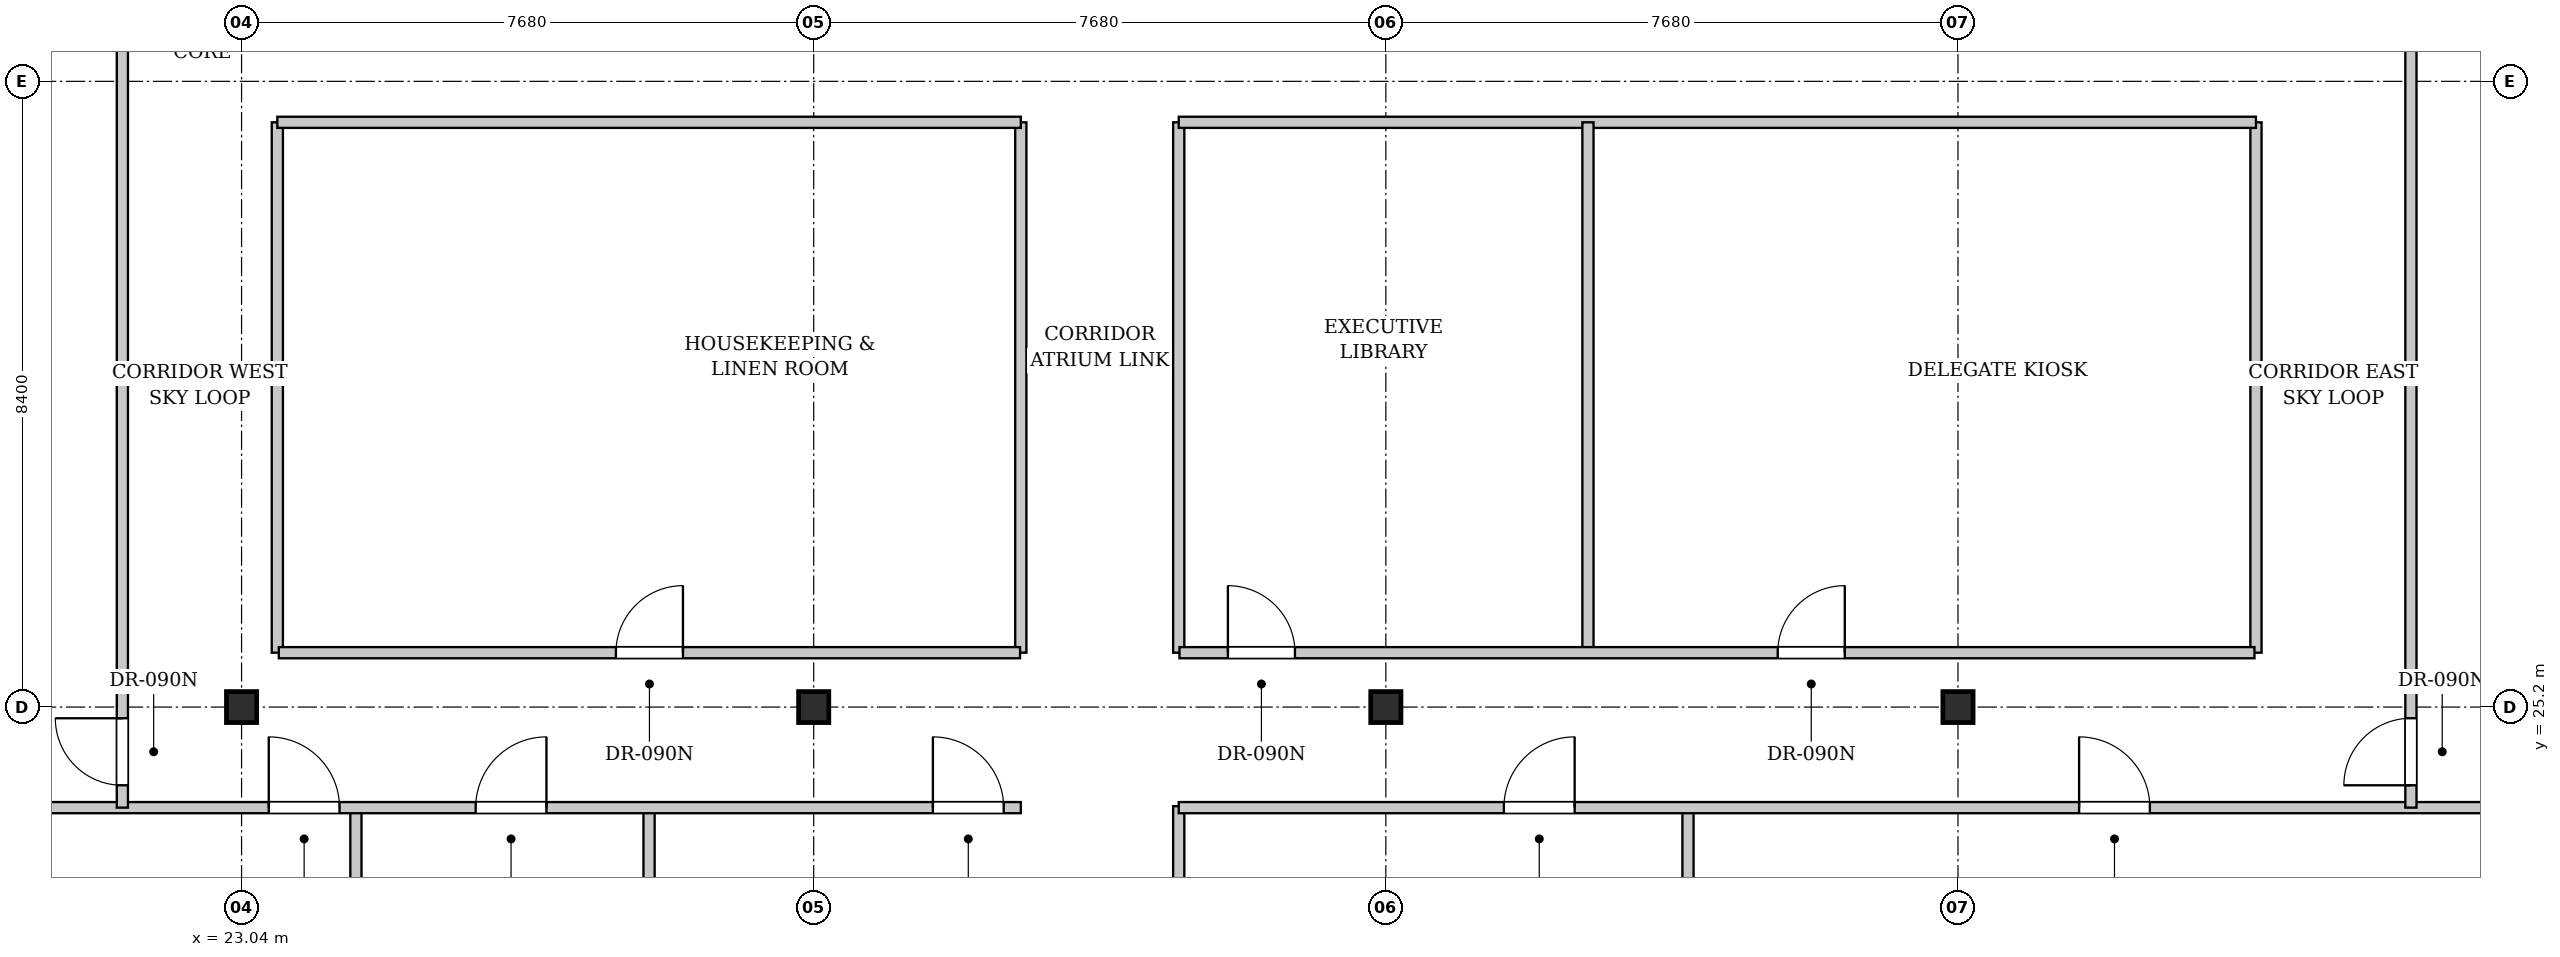
"""IFC4 building model, lengths in metres.
Left out: names, types, materials, properties, quantities, classifications, styles, units other than length and angle.
Written with IfcOpenShell. Run it as: python <this file> out.ifc"""

import sys

from ifc_helpers import new_model, si_unit, direction, frame, frame_2d, origin, origin_2d, place, context, subcontext, project, spatial, rectangle, i_section, extrude, element, fill, save


model = new_model("IFC4")
c1 = context("Model", 3, precision=1e-05, world=origin(), true_north=direction((0.0, 1.0)))
c2 = subcontext(c1, "Body", "Model", "MODEL_VIEW")
j1 = project(units=[si_unit("LENGTHUNIT", "METRE"), si_unit("PLANEANGLEUNIT", "RADIAN")], contexts=[c1])
p1 = place(None, origin())
s1 = spatial("IfcSite", under=j1, at=p1, CompositionType="ELEMENT")
p2 = place(p1, origin())
s2 = spatial("IfcBuilding", under=s1, at=p2, CompositionType="ELEMENT")
p3 = place(p2, frame((0.0, 0.0, 282.9)))
s3 = spatial("IfcBuildingStorey", under=s2, at=p3, CompositionType="ELEMENT", Elevation=282.9)
for number, where, z_axis, x_axis in (
    (1, (23.04, 25.2, 0.0), (0.0, 0.0, 1.0), (1.0, 0.0, 0.0)),
    (2, (30.72, 25.2, 0.0), (0.0, 0.0, 1.0), (1.0, 0.0, 0.0)),
    (3, (38.4, 25.2, 0.0), (0.0, 0.0, 1.0), (1.0, 0.0, 0.0)),
    (4, (46.08, 25.2, 0.0), (0.0, 0.0, 1.0), (1.0, 0.0, 0.0)),
):
    element("IfcColumn", number, at=place(p3, frame(where, z_axis=z_axis, x_axis=x_axis)), inside=s3, PredefinedType="COLUMN", context=c2, shape_type="SweptSolid", body=[
        extrude(i_section(OverallWidth=0.406, OverallDepth=0.416, WebThickness=0.03, FlangeThickness=0.048, FilletRadius=0.015, at=origin_2d()), origin(), (0.0, 0.0, 1.0), 3.4),
    ])
p4 = place(p3, frame((24.575, 18.075, 0.0), z_axis=(0.0, 0.0, 1.0), x_axis=(0.0, 1.0, 0.0)))
e5 = element("IfcWall", 5, at=p4, inside=s3, PredefinedType="PARTITIONING", context=c2, shape_type="SweptSolid", body=[
    extrude(rectangle(XDim=5.795, YDim=0.15, at=frame_2d((2.897, 0.0))), origin(), (0.0, 0.0, 1.0), 3.18),
])
p5 = place(p3, frame((28.51, 17.731, 0.0), z_axis=(0.0, 0.0, 1.0), x_axis=(0.0, 1.0, 0.0)))
e6 = element("IfcWall", 6, at=p5, inside=s3, PredefinedType="PARTITIONING", context=c2, shape_type="SweptSolid", body=[
    extrude(rectangle(XDim=6.139, YDim=0.15, at=frame_2d((3.07, 0.0))), origin(), (0.0, 0.0, 1.0), 3.18),
])
p6 = place(p3, frame((35.62, 17.109, 0.0), z_axis=(0.0, 0.0, 1.0), x_axis=(0.0, 1.0, 0.0)))
e7 = element("IfcWall", 7, at=p6, inside=s3, PredefinedType="PARTITIONING", context=c2, shape_type="SweptSolid", body=[
    extrude(rectangle(XDim=6.761, YDim=0.15, at=frame_2d((3.381, 0.0))), origin(), (0.0, 0.0, 1.0), 3.18),
])
p7 = place(p3, frame((42.456, 16.511, 0.0), z_axis=(0.0, 0.0, 1.0), x_axis=(0.0, 1.0, 0.0)))
e8 = element("IfcWall", 8, at=p7, inside=s3, PredefinedType="PARTITIONING", context=c2, shape_type="SweptSolid", body=[
    extrude(rectangle(XDim=7.359, YDim=0.15, at=frame_2d((3.68, 0.0))), origin(), (0.0, 0.0, 1.0), 3.18),
])
p8 = place(p3, frame((5.847, 23.85, 0.0), z_axis=(0.0, 0.0, 1.0), x_axis=(1.0, 0.0, 0.0)))
e9 = element("IfcWall", 9, at=p8, inside=s3, PredefinedType="PARTITIONING", context=c2, shape_type="SweptSolid", body=[
    extrude(rectangle(XDim=27.653, YDim=0.15, at=frame_2d((13.827, 0.0))), origin(), (0.0, 0.0, 1.0), 2.575),
])
p9 = place(p8, frame((17.558, 0.0, 0.0)))
e10 = element("IfcOpeningElement", 10, at=p9, cuts=e9, PredefinedType="OPENING", context=c2, shape_type="SweptSolid", body=[
    extrude(rectangle(XDim=0.95, YDim=2.15, at=frame_2d((0.475, 1.075))), frame((0.0, 0.085, 0.0), z_axis=(0.0, -1.0, 0.0), x_axis=(1.0, 0.0, 0.0)), (0.0, 0.0, 1.0), 0.17),
])
p10 = place(p8, frame((20.336, 0.0, 0.0)))
e11 = element("IfcOpeningElement", 11, at=p10, cuts=e9, PredefinedType="OPENING", context=c2, shape_type="SweptSolid", body=[
    extrude(rectangle(XDim=0.95, YDim=2.15, at=frame_2d((0.475, 1.075))), frame((0.0, 0.085, 0.0), z_axis=(0.0, -1.0, 0.0), x_axis=(1.0, 0.0, 0.0)), (0.0, 0.0, 1.0), 0.17),
])
p11 = place(p8, frame((26.473, 0.0, 0.0)))
e12 = element("IfcOpeningElement", 12, at=p11, cuts=e9, PredefinedType="OPENING", context=c2, shape_type="SweptSolid", body=[
    extrude(rectangle(XDim=0.95, YDim=2.15, at=frame_2d((0.475, 1.075))), frame((0.0, 0.085, 0.0), z_axis=(0.0, -1.0, 0.0), x_axis=(1.0, 0.0, 0.0)), (0.0, 0.0, 1.0), 0.17),
])
p12 = place(p3, frame((35.62, 23.85, 0.0), z_axis=(0.0, 0.0, 1.0), x_axis=(1.0, 0.0, 0.0)))
e13 = element("IfcWall", 13, at=p12, inside=s3, PredefinedType="PARTITIONING", context=c2, shape_type="SweptSolid", body=[
    extrude(rectangle(XDim=20.257, YDim=0.15, at=frame_2d((10.128, 0.0))), origin(), (0.0, 0.0, 1.0), 3.18),
])
p13 = place(p12, frame((4.365, 0.0, 0.0)))
e14 = element("IfcOpeningElement", 14, at=p13, cuts=e13, PredefinedType="OPENING", context=c2, shape_type="SweptSolid", body=[
    extrude(rectangle(XDim=0.95, YDim=2.15, at=frame_2d((0.475, 1.075))), frame((0.0, 0.085, 0.0), z_axis=(0.0, -1.0, 0.0), x_axis=(1.0, 0.0, 0.0)), (0.0, 0.0, 1.0), 0.17),
])
p14 = place(p12, frame((12.086, 0.0, 0.0)))
e15 = element("IfcOpeningElement", 15, at=p14, cuts=e13, PredefinedType="OPENING", context=c2, shape_type="SweptSolid", body=[
    extrude(rectangle(XDim=0.95, YDim=2.15, at=frame_2d((0.475, 1.075))), frame((0.0, 0.085, 0.0), z_axis=(0.0, -1.0, 0.0), x_axis=(1.0, 0.0, 0.0)), (0.0, 0.0, 1.0), 0.17),
])
p15 = place(p3, frame((21.44, 23.85, 0.0), z_axis=(0.0, 0.0, 1.0), x_axis=(0.0, 1.0, 0.0)))
e16 = element("IfcWall", 16, at=p15, inside=s3, PredefinedType="PARTITIONING", context=c2, shape_type="SweptSolid", body=[
    extrude(rectangle(XDim=25.658, YDim=0.15, at=frame_2d((12.829, 0.0))), origin(), (0.0, 0.0, 1.0), 2.575),
])
p16 = place(p15, frame((0.3, 0.0, 0.0)))
e17 = element("IfcOpeningElement", 17, at=p16, cuts=e16, PredefinedType="OPENING", context=c2, shape_type="SweptSolid", body=[
    extrude(rectangle(XDim=0.9, YDim=2.15, at=frame_2d((0.45, 1.075))), frame((0.0, 0.085, 0.0), z_axis=(0.0, -1.0, 0.0), x_axis=(1.0, 0.0, 0.0)), (0.0, 0.0, 1.0), 0.17),
])
p17 = place(p3, frame((52.16, 23.85, 0.0), z_axis=(0.0, 0.0, 1.0), x_axis=(0.0, 1.0, 0.0)))
e18 = element("IfcWall", 18, at=p17, inside=s3, PredefinedType="PARTITIONING", context=c2, shape_type="SweptSolid", body=[
    extrude(rectangle(XDim=11.29, YDim=0.15, at=frame_2d((5.645, 0.0))), origin(), (0.0, 0.0, 1.0), 3.18),
])
p18 = place(p17, frame((0.3, 0.0, 0.0)))
e19 = element("IfcOpeningElement", 19, at=p18, cuts=e18, PredefinedType="OPENING", context=c2, shape_type="SweptSolid", body=[
    extrude(rectangle(XDim=0.9, YDim=2.15, at=frame_2d((0.45, 1.075))), frame((0.0, 0.085, 0.0), z_axis=(0.0, -1.0, 0.0), x_axis=(1.0, 0.0, 0.0)), (0.0, 0.0, 1.0), 0.17),
])
for number, where, z_axis, x_axis in (
    (20, (23.52, 25.93, 0.0), (0.0, 0.0, 1.0), (0.0, 1.0, 0.0)),
    (21, (50.08, 25.93, 0.0), (0.0, 0.0, 1.0), (0.0, 1.0, 0.0)),
    (22, (33.5, 25.93, 0.0), (0.0, 0.0, 1.0), (0.0, 1.0, 0.0)),
    (23, (35.62, 25.93, 0.0), (0.0, 0.0, 1.0), (0.0, 1.0, 0.0)),
):
    element("IfcWall", number, at=place(p3, frame(where, z_axis=z_axis, x_axis=x_axis)), inside=s3, PredefinedType="PARTITIONING", context=c2, shape_type="SweptSolid", body=[
        extrude(rectangle(XDim=7.12, YDim=0.15, at=frame_2d((3.56, 0.0))), origin(), (0.0, 0.0, 1.0), 3.18),
    ])
p19 = place(p3, frame((23.52, 33.05, 0.0), z_axis=(0.0, 0.0, 1.0), x_axis=(1.0, 0.0, 0.0)))
e24 = element("IfcWall", 24, at=p19, inside=s3, PredefinedType="PARTITIONING", context=c2, shape_type="SweptSolid", body=[
    extrude(rectangle(XDim=9.98, YDim=0.15, at=frame_2d((4.99, 0.0))), origin(), (0.0, 0.0, 1.0), 3.18),
])
p20 = place(p3, frame((35.62, 33.05, 0.0), z_axis=(0.0, 0.0, 1.0), x_axis=(1.0, 0.0, 0.0)))
e25 = element("IfcWall", 25, at=p20, inside=s3, PredefinedType="PARTITIONING", context=c2, shape_type="SweptSolid", body=[
    extrude(rectangle(XDim=14.46, YDim=0.15, at=frame_2d((7.23, 0.0))), origin(), (0.0, 0.0, 1.0), 3.18),
])
p21 = place(p3, frame((23.54, 25.93, 0.0), z_axis=(0.0, 0.0, 1.0), x_axis=(1.0, 0.0, 0.0)))
e26 = element("IfcWall", 26, at=p21, inside=s3, PredefinedType="PARTITIONING", context=c2, shape_type="SweptSolid", body=[
    extrude(rectangle(XDim=9.95, YDim=0.15, at=frame_2d((4.975, 0.0))), origin(), (0.0, 0.0, 1.0), 3.18),
])
p22 = place(p21, frame((4.525, 0.0, 0.0)))
e27 = element("IfcOpeningElement", 27, at=p22, cuts=e26, PredefinedType="OPENING", context=c2, shape_type="SweptSolid", body=[
    extrude(rectangle(XDim=0.9, YDim=2.15, at=frame_2d((0.45, 1.075))), frame((0.0, 0.085, 0.0), z_axis=(0.0, -1.0, 0.0), x_axis=(1.0, 0.0, 0.0)), (0.0, 0.0, 1.0), 0.17),
])
p23 = place(p3, frame((41.113, 25.93, 0.0), z_axis=(0.0, 0.0, 1.0), x_axis=(0.0, 1.0, 0.0)))
e28 = element("IfcWall", 28, at=p23, inside=s3, PredefinedType="PARTITIONING", context=c2, shape_type="SweptSolid", body=[
    extrude(rectangle(XDim=7.12, YDim=0.15, at=frame_2d((3.56, 0.0))), origin(), (0.0, 0.0, 1.0), 3.18),
])
p24 = place(p3, frame((35.63, 25.93, 0.0), z_axis=(0.0, 0.0, 1.0), x_axis=(1.0, 0.0, 0.0)))
e29 = element("IfcWall", 29, at=p24, inside=s3, PredefinedType="PARTITIONING", context=c2, shape_type="SweptSolid", body=[
    extrude(rectangle(XDim=14.43, YDim=0.15, at=frame_2d((7.215, 0.0))), origin(), (0.0, 0.0, 1.0), 3.18),
])
p25 = place(p24, frame((0.65, 0.0, 0.0)))
e30 = element("IfcOpeningElement", 30, at=p25, cuts=e29, PredefinedType="OPENING", context=c2, shape_type="SweptSolid", body=[
    extrude(rectangle(XDim=0.9, YDim=2.15, at=frame_2d((0.45, 1.075))), frame((0.0, 0.085, 0.0), z_axis=(0.0, -1.0, 0.0), x_axis=(1.0, 0.0, 0.0)), (0.0, 0.0, 1.0), 0.17),
])
p26 = place(p24, frame((8.031, 0.0, 0.0)))
e31 = element("IfcOpeningElement", 31, at=p26, cuts=e29, PredefinedType="OPENING", context=c2, shape_type="SweptSolid", body=[
    extrude(rectangle(XDim=0.9, YDim=2.15, at=frame_2d((0.45, 1.075))), frame((0.0, 0.085, 0.0), z_axis=(0.0, -1.0, 0.0), x_axis=(1.0, 0.0, 0.0)), (0.0, 0.0, 1.0), 0.17),
])
p27 = place(p9, origin())
e32 = element("IfcDoor", 32, at=p27, inside=s3, OperationType="SINGLE_SWING_LEFT", PredefinedType="DOOR", context=c2, shape_type="SweptSolid", body=[
    extrude(rectangle(XDim=0.95, YDim=2.15, at=frame_2d((0.475, 1.075))), frame((0.0, 0.025, 0.0), z_axis=(0.0, -1.0, 0.0), x_axis=(1.0, 0.0, 0.0)), (0.0, 0.0, 1.0), 0.05),
])
fill(e10, e32)
p28 = place(p10, origin())
e33 = element("IfcDoor", 33, at=p28, inside=s3, OperationType="SINGLE_SWING_RIGHT", PredefinedType="DOOR", context=c2, shape_type="SweptSolid", body=[
    extrude(rectangle(XDim=0.95, YDim=2.15, at=frame_2d((0.475, 1.075))), frame((0.0, 0.025, 0.0), z_axis=(0.0, -1.0, 0.0), x_axis=(1.0, 0.0, 0.0)), (0.0, 0.0, 1.0), 0.05),
])
fill(e11, e33)
p29 = place(p11, origin())
e34 = element("IfcDoor", 34, at=p29, inside=s3, OperationType="SINGLE_SWING_LEFT", PredefinedType="DOOR", context=c2, shape_type="SweptSolid", body=[
    extrude(rectangle(XDim=0.95, YDim=2.15, at=frame_2d((0.475, 1.075))), frame((0.0, 0.025, 0.0), z_axis=(0.0, -1.0, 0.0), x_axis=(1.0, 0.0, 0.0)), (0.0, 0.0, 1.0), 0.05),
])
fill(e12, e34)
p30 = place(p13, origin())
e35 = element("IfcDoor", 35, at=p30, inside=s3, OperationType="SINGLE_SWING_RIGHT", PredefinedType="DOOR", context=c2, shape_type="SweptSolid", body=[
    extrude(rectangle(XDim=0.95, YDim=2.15, at=frame_2d((0.475, 1.075))), frame((0.0, 0.025, 0.0), z_axis=(0.0, -1.0, 0.0), x_axis=(1.0, 0.0, 0.0)), (0.0, 0.0, 1.0), 0.05),
])
fill(e14, e35)
p31 = place(p14, origin())
e36 = element("IfcDoor", 36, at=p31, inside=s3, OperationType="SINGLE_SWING_LEFT", PredefinedType="DOOR", context=c2, shape_type="SweptSolid", body=[
    extrude(rectangle(XDim=0.95, YDim=2.15, at=frame_2d((0.475, 1.075))), frame((0.0, 0.025, 0.0), z_axis=(0.0, -1.0, 0.0), x_axis=(1.0, 0.0, 0.0)), (0.0, 0.0, 1.0), 0.05),
])
fill(e15, e36)
p32 = place(p16, origin())
e37 = element("IfcDoor", 37, at=p32, inside=s3, OperationType="SINGLE_SWING_RIGHT", PredefinedType="DOOR", context=c2, shape_type="SweptSolid", body=[
    extrude(rectangle(XDim=0.9, YDim=2.15, at=frame_2d((0.45, 1.075))), frame((0.0, 0.025, 0.0), z_axis=(0.0, -1.0, 0.0), x_axis=(1.0, 0.0, 0.0)), (0.0, 0.0, 1.0), 0.05),
])
fill(e17, e37)
p33 = place(p18, origin())
e38 = element("IfcDoor", 38, at=p33, inside=s3, OperationType="SINGLE_SWING_LEFT", PredefinedType="DOOR", context=c2, shape_type="SweptSolid", body=[
    extrude(rectangle(XDim=0.9, YDim=2.15, at=frame_2d((0.45, 1.075))), frame((0.0, 0.025, 0.0), z_axis=(0.0, -1.0, 0.0), x_axis=(1.0, 0.0, 0.0)), (0.0, 0.0, 1.0), 0.05),
])
fill(e19, e38)
p34 = place(p22, origin())
e39 = element("IfcDoor", 39, at=p34, inside=s3, OperationType="SINGLE_SWING_RIGHT", PredefinedType="DOOR", context=c2, shape_type="SweptSolid", body=[
    extrude(rectangle(XDim=0.9, YDim=2.15, at=frame_2d((0.45, 1.075))), frame((0.0, 0.025, 0.0), z_axis=(0.0, -1.0, 0.0), x_axis=(1.0, 0.0, 0.0)), (0.0, 0.0, 1.0), 0.05),
])
fill(e27, e39)
p35 = place(p25, origin())
e40 = element("IfcDoor", 40, at=p35, inside=s3, OperationType="SINGLE_SWING_LEFT", PredefinedType="DOOR", context=c2, shape_type="SweptSolid", body=[
    extrude(rectangle(XDim=0.9, YDim=2.15, at=frame_2d((0.45, 1.075))), frame((0.0, 0.025, 0.0), z_axis=(0.0, -1.0, 0.0), x_axis=(1.0, 0.0, 0.0)), (0.0, 0.0, 1.0), 0.05),
])
fill(e30, e40)
p36 = place(p26, origin())
e41 = element("IfcDoor", 41, at=p36, inside=s3, OperationType="SINGLE_SWING_RIGHT", PredefinedType="DOOR", context=c2, shape_type="SweptSolid", body=[
    extrude(rectangle(XDim=0.9, YDim=2.15, at=frame_2d((0.45, 1.075))), frame((0.0, 0.025, 0.0), z_axis=(0.0, -1.0, 0.0), x_axis=(1.0, 0.0, 0.0)), (0.0, 0.0, 1.0), 0.05),
])
fill(e31, e41)
save(model, sys.argv[1])
